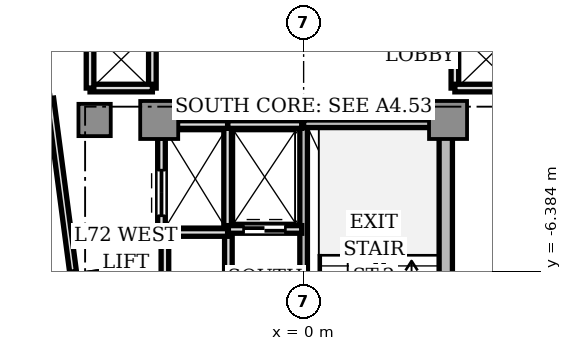
"""IFC4 building model, lengths in metres.
Left out: names, types, materials, properties, quantities, classifications, styles, units other than length and angle.
Written with IfcOpenShell. Run it as: python <this file> out.ifc"""

import sys

from ifc_helpers import new_model, si_unit, direction, frame, frame_2d, origin, origin_2d, place, context, subcontext, project, spatial, rectangle, extrude, source, transform, mapped, element, fill, save


model = new_model("IFC4")
c1 = context("Model", 3, precision=1e-05, world=origin(), true_north=direction((0.0, 1.0)))
c2 = subcontext(c1, "Body", "Model", "MODEL_VIEW")
j1 = project(units=[si_unit("LENGTHUNIT", "METRE"), si_unit("PLANEANGLEUNIT", "RADIAN")], contexts=[c1])
p1 = place(None, origin())
s1 = spatial("IfcSite", under=j1, at=p1, CompositionType="ELEMENT")
p2 = place(p1, origin())
s2 = spatial("IfcBuilding", under=s1, at=p2, CompositionType="ELEMENT")
p3 = place(p2, frame((0.0, 0.0, 257.9)))
s3 = spatial("IfcBuildingStorey", under=s2, at=p3, CompositionType="ELEMENT", Elevation=257.9)
p4 = place(p3, frame((3.74, -9.75, 0.0), z_axis=(0.0, 0.0, 1.0), x_axis=(0.0, 1.0, 0.0)))
e1 = element("IfcWall", 1, at=p4, inside=s3, PredefinedType="SHEAR", context=c2, shape_type="SweptSolid", body=[
    extrude(rectangle(XDim=6.9, YDim=0.35, at=frame_2d((3.45, 0.0))), origin(), (0.0, 0.0, 1.0), 3.11),
])
m1 = source(origin(), c2, "Body", "SweptSolid", [
    extrude(rectangle(XDim=1.0, YDim=1.0, at=origin_2d()), origin(), (0.0, 0.0, 1.0), 3.11),
])
for number, where, z_axis, x_axis in (
    (2, (-3.8, -2.4, 0.0), (0.0, 0.0, 1.0), (1.0, 0.0, 0.0)),
    (3, (3.8, -2.4, 0.0), (0.0, 0.0, 1.0), (1.0, 0.0, 0.0)),
):
    element("IfcColumn", number, at=place(p3, frame(where, z_axis=z_axis, x_axis=x_axis)), inside=s3, PredefinedType="COLUMN", context=c2, shape_type="MappedRepresentation", body=[
        mapped(m1, transform((0.0, 0.0, 0.0), scale=1.0)),
    ])
m2 = source(origin(), c2, "Body", "SweptSolid", [
    extrude(rectangle(XDim=0.85, YDim=0.85, at=origin_2d()), origin(), (0.0, 0.0, 1.0), 3.11),
])
p5 = place(p3, frame((-5.5, -2.4, 0.0), z_axis=(0.0, 0.0, 1.0), x_axis=(1.0, 0.0, 0.0)))
e4 = element("IfcColumn", 4, at=p5, inside=s3, PredefinedType="COLUMN", context=c2, shape_type="MappedRepresentation", body=[
    mapped(m2, transform((0.0, 0.0, 0.0), scale=1.0)),
])
p6 = place(p3, frame((-4.821, -6.283, 0.0), z_axis=(0.0, 0.0, 1.0), x_axis=(0.130475563272, -0.991451525486, 0.0)))
e5 = element("IfcWall", 5, at=p6, inside=s3, PredefinedType="STANDARD", context=c2, shape_type="SweptSolid", body=[
    extrude(rectangle(XDim=2.7, YDim=0.22, at=frame_2d((1.35, 0.0))), origin(), (0.0, 0.0, 1.0), 3.11),
])
p7 = place(p6, frame((1.4, 0.0, 0.0)))
e6 = element("IfcOpeningElement", 6, at=p7, cuts=e5, PredefinedType="OPENING", context=c2, shape_type="SweptSolid", body=[
    extrude(rectangle(XDim=1.0, YDim=2.2, at=frame_2d((0.5, 1.1))), frame((0.0, 0.12, 0.0), z_axis=(0.0, -1.0, 0.0), x_axis=(1.0, 0.0, 0.0)), (0.0, 0.0, 1.0), 0.24),
])
p8 = place(p3, frame((0.0, -10.18, 0.0), z_axis=(0.0, 0.0, 1.0), x_axis=(0.0, 1.0, 0.0)))
e7 = element("IfcWall", 7, at=p8, inside=s3, PredefinedType="SOLIDWALL", context=c2, shape_type="SweptSolid", body=[
    extrude(rectangle(XDim=7.68, YDim=0.2, at=frame_2d((3.84, 0.0))), origin(), (0.0, 0.0, 1.0), 3.11),
])
p9 = place(p8, frame((0.28, 0.0, 0.0)))
e8 = element("IfcOpeningElement", 8, at=p9, cuts=e7, PredefinedType="OPENING", context=c2, shape_type="SweptSolid", body=[
    extrude(rectangle(XDim=1.1, YDim=2.15, at=frame_2d((0.55, 1.075))), frame((0.0, 0.11, 0.0), z_axis=(0.0, -1.0, 0.0), x_axis=(1.0, 0.0, 0.0)), (0.0, 0.0, 1.0), 0.22),
])
p10 = place(p3, frame((0.0, -2.5, 0.0), z_axis=(0.0, 0.0, 1.0), x_axis=(1.0, 0.0, 0.0)))
e9 = element("IfcWall", 9, at=p10, inside=s3, PredefinedType="SOLIDWALL", context=c2, shape_type="SweptSolid", body=[
    extrude(rectangle(XDim=3.72, YDim=0.2, at=frame_2d((1.86, 0.0))), origin(), (0.0, 0.0, 1.0), 3.11),
])
p11 = place(p3, frame((-1.98, -9.98, 0.0), z_axis=(0.0, 0.0, 1.0), x_axis=(0.0, 1.0, 0.0)))
e10 = element("IfcWall", 10, at=p11, inside=s3, PredefinedType="SOLIDWALL", context=c2, shape_type="SweptSolid", body=[
    extrude(rectangle(XDim=4.66, YDim=0.2, at=frame_2d((2.33, 0.0))), origin(), (0.0, 0.0, 1.0), 2.66),
])
p12 = place(p11, frame((0.2, 0.0, 0.0)))
e11 = element("IfcOpeningElement", 11, at=p12, cuts=e10, PredefinedType="OPENING", context=c2, shape_type="SweptSolid", body=[
    extrude(rectangle(XDim=0.85, YDim=2.1, at=frame_2d((0.425, 1.05))), frame((0.0, 0.11, 0.0), z_axis=(0.0, -1.0, 0.0), x_axis=(1.0, 0.0, 0.0)), (0.0, 0.0, 1.0), 0.22),
])
p13 = place(p3, frame((-2.0, -5.28, 0.0), z_axis=(0.0, 0.0, 1.0), x_axis=(0.0, 1.0, 0.0)))
e12 = element("IfcWall", 12, at=p13, inside=s3, PredefinedType="SOLIDWALL", context=c2, shape_type="SweptSolid", body=[
    extrude(rectangle(XDim=2.78, YDim=0.2, at=frame_2d((1.39, 0.0))), origin(), (0.0, 0.0, 1.0), 2.66),
])
p14 = place(p3, frame((-2.0, -2.52, 0.0), z_axis=(0.0, 0.0, 1.0), x_axis=(1.0, 0.0, 0.0)))
e13 = element("IfcWall", 13, at=p14, inside=s3, PredefinedType="SOLIDWALL", context=c2, shape_type="SweptSolid", body=[
    extrude(rectangle(XDim=1.95, YDim=0.2, at=frame_2d((0.975, 0.0))), origin(), (0.0, 0.0, 1.0), 2.66),
])
p15 = place(p3, frame((-1.98, -5.28, 0.0), z_axis=(0.0, 0.0, 1.0), x_axis=(1.0, 0.0, 0.0)))
e14 = element("IfcWall", 14, at=p15, inside=s3, PredefinedType="SOLIDWALL", context=c2, shape_type="SweptSolid", body=[
    extrude(rectangle(XDim=1.93, YDim=0.2, at=frame_2d((0.965, 0.0))), origin(), (0.0, 0.0, 1.0), 2.66),
])
p16 = place(p15, frame((0.4, 0.0, 0.0)))
e15 = element("IfcOpeningElement", 15, at=p16, cuts=e14, PredefinedType="OPENING", context=c2, shape_type="SweptSolid", body=[
    extrude(rectangle(XDim=1.1, YDim=2.2, at=frame_2d((0.55, 1.1))), frame((0.0, 0.11, 0.0), z_axis=(0.0, -1.0, 0.0), x_axis=(1.0, 0.0, 0.0)), (0.0, 0.0, 1.0), 0.22),
])
p17 = place(p3, frame((-3.32, -2.52, 0.0), z_axis=(0.0, 0.0, 1.0), x_axis=(1.0, 0.0, 0.0)))
e16 = element("IfcWall", 16, at=p17, inside=s3, PredefinedType="SOLIDWALL", context=c2, shape_type="SweptSolid", body=[
    extrude(rectangle(XDim=1.32, YDim=0.2, at=frame_2d((0.66, 0.0))), origin(), (0.0, 0.0, 1.0), 2.66),
])
p18 = place(p3, frame((-3.74, -5.36, 0.0), z_axis=(0.0, 0.0, 1.0), x_axis=(1.0, 0.0, 0.0)))
e17 = element("IfcWall", 17, at=p18, inside=s3, PredefinedType="SOLIDWALL", context=c2, shape_type="SweptSolid", body=[
    extrude(rectangle(XDim=1.74, YDim=0.2, at=frame_2d((0.87, 0.0))), origin(), (0.0, 0.0, 1.0), 2.66),
])
p19 = place(p3, frame((-3.74, -5.36, 0.0), z_axis=(0.0, 0.0, 1.0), x_axis=(0.0, 1.0, 0.0)))
e18 = element("IfcWall", 18, at=p19, inside=s3, PredefinedType="SOLIDWALL", context=c2, shape_type="SweptSolid", body=[
    extrude(rectangle(XDim=2.48, YDim=0.2, at=frame_2d((1.24, 0.0))), origin(), (0.0, 0.0, 1.0), 2.66),
])
p20 = place(p19, frame((0.44, 0.0, 0.0)))
e19 = element("IfcOpeningElement", 19, at=p20, cuts=e18, PredefinedType="OPENING", context=c2, shape_type="SweptSolid", body=[
    extrude(rectangle(XDim=1.2, YDim=2.2, at=frame_2d((0.6, 1.1))), frame((0.0, 0.11, 0.0), z_axis=(0.0, -1.0, 0.0), x_axis=(1.0, 0.0, 0.0)), (0.0, 0.0, 1.0), 0.22),
])
p21 = place(p3, frame((3.98, -1.56, 0.0), z_axis=(0.0, 0.0, 1.0), x_axis=(0.0, 1.0, 0.0)))
e20 = element("IfcWall", 20, at=p21, inside=s3, PredefinedType="SOLIDWALL", context=c2, shape_type="SweptSolid", body=[
    extrude(rectangle(XDim=3.12, YDim=0.2, at=frame_2d((1.56, 0.0))), origin(), (0.0, 0.0, 1.0), 2.33),
])
p22 = place(p3, frame((3.98, -1.56, 0.0), z_axis=(0.0, 0.0, 1.0), x_axis=(1.0, 0.0, 0.0)))
e21 = element("IfcWall", 21, at=p22, inside=s3, PredefinedType="SOLIDWALL", context=c2, shape_type="SweptSolid", body=[
    extrude(rectangle(XDim=1.64, YDim=0.2, at=frame_2d((0.82, 0.0))), origin(), (0.0, 0.0, 1.0), 2.66),
])
p23 = place(p3, frame((-3.98, -1.56, 0.0), z_axis=(0.0, 0.0, 1.0), x_axis=(0.0, 1.0, 0.0)))
e22 = element("IfcWall", 22, at=p23, inside=s3, PredefinedType="SOLIDWALL", context=c2, shape_type="SweptSolid", body=[
    extrude(rectangle(XDim=3.12, YDim=0.2, at=frame_2d((1.56, 0.0))), origin(), (0.0, 0.0, 1.0), 2.33),
])
p24 = place(p3, frame((-5.62, -1.56, 0.0), z_axis=(0.0, 0.0, 1.0), x_axis=(1.0, 0.0, 0.0)))
e23 = element("IfcWall", 23, at=p24, inside=s3, PredefinedType="SOLIDWALL", context=c2, shape_type="SweptSolid", body=[
    extrude(rectangle(XDim=1.64, YDim=0.2, at=frame_2d((0.82, 0.0))), origin(), (0.0, 0.0, 1.0), 2.66),
])
p25 = place(p3, frame((-5.62, -1.56, 0.0), z_axis=(0.0, 0.0, 1.0), x_axis=(0.0, 1.0, 0.0)))
e24 = element("IfcWall", 24, at=p25, inside=s3, PredefinedType="SOLIDWALL", context=c2, shape_type="SweptSolid", body=[
    extrude(rectangle(XDim=1.56, YDim=0.2, at=frame_2d((0.78, 0.0))), origin(), (0.0, 0.0, 1.0), 2.66),
])
p26 = place(p3, frame((-3.65, -8.81, 0.0), z_axis=(0.0, 0.0, 1.0), x_axis=(0.0, 1.0, 0.0)))
e25 = element("IfcWall", 25, at=p26, inside=s3, PredefinedType="SOLIDWALL", context=c2, shape_type="SweptSolid", body=[
    extrude(rectangle(XDim=3.43, YDim=0.2, at=frame_2d((1.715, 0.0))), origin(), (0.0, 0.0, 1.0), 2.66),
])
p27 = place(p26, frame((1.2, 0.0, 0.0)))
e26 = element("IfcOpeningElement", 26, at=p27, cuts=e25, PredefinedType="OPENING", context=c2, shape_type="SweptSolid", body=[
    extrude(rectangle(XDim=0.95, YDim=2.15, at=frame_2d((0.475, 1.075))), frame((0.0, 0.11, 0.0), z_axis=(0.0, -1.0, 0.0), x_axis=(1.0, 0.0, 0.0)), (0.0, 0.0, 1.0), 0.22),
])
p28 = place(p3, frame((-6.667, -1.836, 0.0), z_axis=(0.0, 0.0, 1.0), x_axis=(0.130564346904, -0.991439837467, 0.0)))
e27 = element("IfcWall", 27, at=p28, inside=s3, PredefinedType="PARTITIONING", context=c2, shape_type="SweptSolid", body=[
    extrude(rectangle(XDim=4.6, YDim=0.18, at=frame_2d((2.3, 0.0))), origin(), (0.0, 0.0, 1.0), 2.66),
])
m3 = source(origin(), c2, "Body", "SweptSolid", [
    extrude(rectangle(XDim=1.1, YDim=0.05, at=origin_2d()), origin(), (0.0, 0.0, 1.0), 2.2),
])
p29 = place(p16, frame((0.55, 0.0, 0.0)))
e28 = element("IfcDoor", 28, at=p29, inside=s3, OperationType="DOUBLE_DOOR_SLIDING", PredefinedType="DOOR", context=c2, shape_type="MappedRepresentation", body=[
    mapped(m3, transform((0.0, 0.0, 0.0), scale=1.0)),
])
fill(e15, e28)
m4 = source(origin(), c2, "Body", "SweptSolid", [
    extrude(rectangle(XDim=1.2, YDim=0.05, at=origin_2d()), origin(), (0.0, 0.0, 1.0), 2.2),
])
p30 = place(p20, frame((0.6, 0.0, 0.0)))
e29 = element("IfcDoor", 29, at=p30, inside=s3, OperationType="DOUBLE_DOOR_SLIDING", PredefinedType="DOOR", context=c2, shape_type="MappedRepresentation", body=[
    mapped(m4, transform((0.0, 0.0, 0.0), scale=1.0)),
])
fill(e19, e29)
save(model, sys.argv[1])
